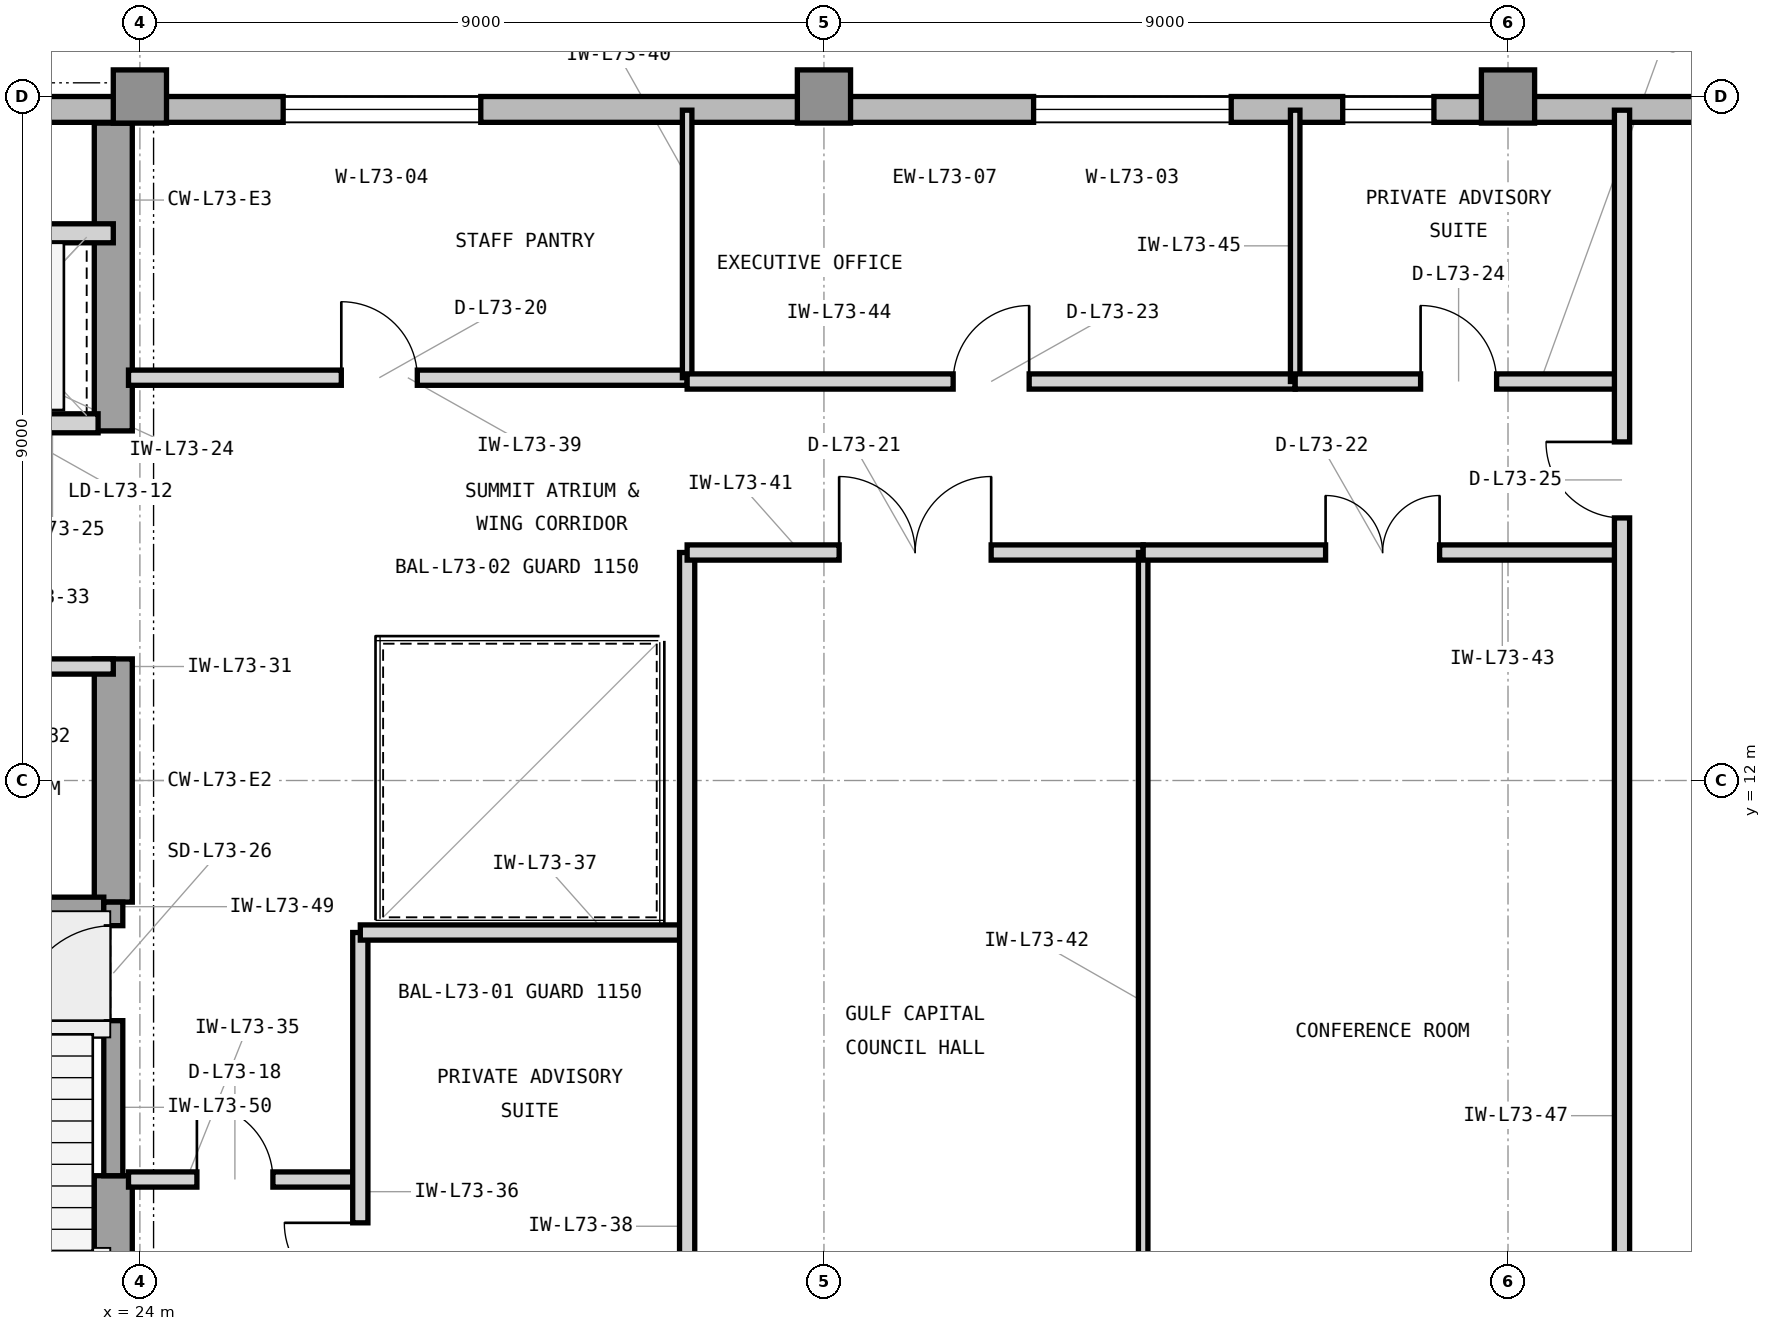
"""IFC4 building model, lengths in metres.
Left out: names, types, materials, properties, quantities, classifications, styles, units other than length and angle.
Written with IfcOpenShell. Run it as: python <this file> out.ifc"""

import sys

from ifc_helpers import new_model, si_unit, direction, frame, frame_2d, origin, origin_2d, place, context, subcontext, project, spatial, rectangle, extrude, element, fill, save


model = new_model("IFC4")
c1 = context("Model", 3, precision=1e-05, world=origin(), true_north=direction((0.0, 1.0)))
c2 = subcontext(c1, "Body", "Model", "MODEL_VIEW")
j1 = project(units=[si_unit("LENGTHUNIT", "METRE"), si_unit("PLANEANGLEUNIT", "RADIAN")], contexts=[c1])
p1 = place(None, origin())
s1 = spatial("IfcSite", under=j1, at=p1, CompositionType="ELEMENT")
p2 = place(p1, origin())
s2 = spatial("IfcBuilding", under=s1, at=p2, CompositionType="ELEMENT")
p3 = place(p2, frame((0.0, 0.0, 297.6)))
s3 = spatial("IfcBuildingStorey", under=s2, at=p3, CompositionType="ELEMENT", Elevation=297.6)
p4 = place(p3, frame((23.65, 3.6, 0.0), z_axis=(0.0, 0.0, 1.0), x_axis=(0.0, 1.0, 0.0)))
e1 = element("IfcWall", 1, at=p4, inside=s3, PredefinedType="SHEAR", context=c2, shape_type="SweptSolid", body=[
    extrude(rectangle(XDim=3.2, YDim=0.5, at=frame_2d((1.6, 0.0))), origin(), (0.0, 0.0, 1.0), 3.9),
])
p5 = place(p3, frame((23.65, 10.4, 0.0), z_axis=(0.0, 0.0, 1.0), x_axis=(0.0, 1.0, 0.0)))
e2 = element("IfcWall", 2, at=p5, inside=s3, PredefinedType="SHEAR", context=c2, shape_type="SweptSolid", body=[
    extrude(rectangle(XDim=3.2, YDim=0.5, at=frame_2d((1.6, 0.0))), origin(), (0.0, 0.0, 1.0), 3.9),
])
p6 = place(p3, frame((23.65, 16.6, 0.0), z_axis=(0.0, 0.0, 1.0), x_axis=(0.0, 1.0, 0.0)))
e3 = element("IfcWall", 3, at=p6, inside=s3, PredefinedType="SHEAR", context=c2, shape_type="SweptSolid", body=[
    extrude(rectangle(XDim=4.05, YDim=0.5, at=frame_2d((2.025, 0.0))), origin(), (0.0, 0.0, 1.0), 3.9),
])
for number, where, z_axis, x_axis in (
    (4, (24.0, 21.0, 0.0), (0.0, 0.0, 1.0), (1.0, 0.0, 0.0)),
    (5, (33.0, 21.0, 0.0), (0.0, 0.0, 1.0), (1.0, 0.0, 0.0)),
    (6, (42.0, 21.0, 0.0), (0.0, 0.0, 1.0), (1.0, 0.0, 0.0)),
):
    element("IfcColumn", number, at=place(p3, frame(where, z_axis=z_axis, x_axis=x_axis)), inside=s3, PredefinedType="COLUMN", context=c2, shape_type="SweptSolid", body=[
        extrude(rectangle(XDim=0.7, YDim=0.7, at=origin_2d()), origin(), (0.0, 0.0, 1.0), 3.9),
    ])
p7 = place(p3, frame((49.4, 20.83, 0.0), z_axis=(0.0, 0.0, 1.0), x_axis=(-1.0, 0.0, 0.0)))
e7 = element("IfcWall", 7, at=p7, inside=s3, PredefinedType="STANDARD", context=c2, shape_type="SweptSolid", body=[
    extrude(rectangle(XDim=29.62, YDim=0.34, at=frame_2d((14.81, 0.0))), origin(), (0.0, 0.0, 1.0), 3.715),
])
p8 = place(p7, frame((11.042, 0.0, 0.8)))
e8 = element("IfcOpeningElement", 8, at=p8, cuts=e7, PredefinedType="OPENING", context=c2, shape_type="SweptSolid", body=[
    extrude(rectangle(XDim=2.6, YDim=2.35, at=frame_2d((1.3, 1.175))), frame((0.0, 0.18, 0.0), z_axis=(0.0, -1.0, 0.0), x_axis=(1.0, 0.0, 0.0)), (0.0, 0.0, 1.0), 0.36),
])
p9 = place(p7, frame((20.915, 0.0, 0.8)))
e9 = element("IfcOpeningElement", 9, at=p9, cuts=e7, PredefinedType="OPENING", context=c2, shape_type="SweptSolid", body=[
    extrude(rectangle(XDim=2.6, YDim=2.35, at=frame_2d((1.3, 1.175))), frame((0.0, 0.18, 0.0), z_axis=(0.0, -1.0, 0.0), x_axis=(1.0, 0.0, 0.0)), (0.0, 0.0, 1.0), 0.36),
])
p10 = place(p7, frame((8.375, 0.0, 0.8)))
e10 = element("IfcOpeningElement", 10, at=p10, cuts=e7, PredefinedType="OPENING", context=c2, shape_type="SweptSolid", body=[
    extrude(rectangle(XDim=1.2, YDim=2.35, at=frame_2d((0.6, 1.175))), frame((0.0, 0.18, 0.0), z_axis=(0.0, -1.0, 0.0), x_axis=(1.0, 0.0, 0.0)), (0.0, 0.0, 1.0), 0.36),
])
p11 = place(p3, frame((21.05, 16.7, 0.0), z_axis=(0.0, 0.0, 1.0), x_axis=(1.0, 0.0, 0.0)))
e11 = element("IfcWall", 11, at=p11, inside=s3, PredefinedType="PARTITIONING", context=c2, shape_type="SweptSolid", body=[
    extrude(rectangle(XDim=2.4, YDim=0.25, at=frame_2d((1.2, 0.0))), origin(), (0.0, 0.0, 1.0), 3.354),
])
p12 = place(p11, frame((0.52, 0.0, 0.0)))
e12 = element("IfcOpeningElement", 12, at=p12, cuts=e11, PredefinedType="OPENING", context=c2, shape_type="SweptSolid", body=[
    extrude(rectangle(XDim=1.15, YDim=2.25, at=frame_2d((0.575, 1.125))), frame((0.0, 0.135, 0.0), z_axis=(0.0, -1.0, 0.0), x_axis=(1.0, 0.0, 0.0)), (0.0, 0.0, 1.0), 0.27),
])
p13 = place(p3, frame((16.45, 19.2, 0.0), z_axis=(0.0, 0.0, 1.0), x_axis=(1.0, 0.0, 0.0)))
e13 = element("IfcWall", 13, at=p13, inside=s3, PredefinedType="PARTITIONING", context=c2, shape_type="SweptSolid", body=[
    extrude(rectangle(XDim=7.2, YDim=0.25, at=frame_2d((3.6, 0.0))), origin(), (0.0, 0.0, 1.0), 3.705),
])
p14 = place(p3, frame((18.45, 13.5, 0.0), z_axis=(0.0, 0.0, 1.0), x_axis=(1.0, 0.0, 0.0)))
e14 = element("IfcWall", 14, at=p14, inside=s3, PredefinedType="PARTITIONING", context=c2, shape_type="SweptSolid", body=[
    extrude(rectangle(XDim=5.2, YDim=0.2, at=frame_2d((2.6, 0.0))), origin(), (0.0, 0.0, 1.0), 3.354),
])
p15 = place(p14, frame((2.125, 0.0, 0.0)))
e15 = element("IfcOpeningElement", 15, at=p15, cuts=e14, PredefinedType="OPENING", context=c2, shape_type="SweptSolid", body=[
    extrude(rectangle(XDim=0.95, YDim=2.1, at=frame_2d((0.475, 1.05))), frame((0.0, 0.11, 0.0), z_axis=(0.0, -1.0, 0.0), x_axis=(1.0, 0.0, 0.0)), (0.0, 0.0, 1.0), 0.22),
])
p16 = place(p3, frame((23.85, 6.75, 0.0), z_axis=(0.0, 0.0, 1.0), x_axis=(1.0, 0.0, 0.0)))
e16 = element("IfcWall", 16, at=p16, inside=s3, PredefinedType="PARTITIONING", context=c2, shape_type="SweptSolid", body=[
    extrude(rectangle(XDim=3.05, YDim=0.2, at=frame_2d((1.525, 0.0))), origin(), (0.0, 0.0, 1.0), 3.705),
])
p17 = place(p16, frame((0.9, 0.0, 0.0)))
e17 = element("IfcOpeningElement", 17, at=p17, cuts=e16, PredefinedType="OPENING", context=c2, shape_type="SweptSolid", body=[
    extrude(rectangle(XDim=1.0, YDim=2.15, at=frame_2d((0.5, 1.075))), frame((0.0, 0.11, 0.0), z_axis=(0.0, -1.0, 0.0), x_axis=(1.0, 0.0, 0.0)), (0.0, 0.0, 1.0), 0.22),
])
p18 = place(p3, frame((26.9, 3.18, 0.0), z_axis=(0.0, 0.0, 1.0), x_axis=(0.0, 1.0, 0.0)))
e18 = element("IfcWall", 18, at=p18, inside=s3, PredefinedType="PARTITIONING", context=c2, shape_type="SweptSolid", body=[
    extrude(rectangle(XDim=6.82, YDim=0.2, at=frame_2d((3.41, 0.0))), origin(), (0.0, 0.0, 1.0), 3.705),
])
p19 = place(p18, frame((2.0, 0.0, 0.0)))
e19 = element("IfcOpeningElement", 19, at=p19, cuts=e18, PredefinedType="OPENING", context=c2, shape_type="SweptSolid", body=[
    extrude(rectangle(XDim=1.0, YDim=2.15, at=frame_2d((0.5, 1.075))), frame((0.0, 0.11, 0.0), z_axis=(0.0, -1.0, 0.0), x_axis=(1.0, 0.0, 0.0)), (0.0, 0.0, 1.0), 0.22),
])
p20 = place(p3, frame((26.9, 10.0, 0.0), z_axis=(0.0, 0.0, 1.0), x_axis=(1.0, 0.0, 0.0)))
e20 = element("IfcWall", 20, at=p20, inside=s3, PredefinedType="PARTITIONING", context=c2, shape_type="SweptSolid", body=[
    extrude(rectangle(XDim=4.3, YDim=0.2, at=frame_2d((2.15, 0.0))), origin(), (0.0, 0.0, 1.0), 3.705),
])
p21 = place(p3, frame((31.2, 3.18, 0.0), z_axis=(0.0, 0.0, 1.0), x_axis=(0.0, 1.0, 0.0)))
e21 = element("IfcWall", 21, at=p21, inside=s3, PredefinedType="PARTITIONING", context=c2, shape_type="SweptSolid", body=[
    extrude(rectangle(XDim=11.82, YDim=0.2, at=frame_2d((5.91, 0.0))), origin(), (0.0, 0.0, 1.0), 3.705),
])
p22 = place(p3, frame((23.85, 17.3, 0.0), z_axis=(0.0, 0.0, 1.0), x_axis=(1.0, 0.0, 0.0)))
e22 = element("IfcWall", 22, at=p22, inside=s3, PredefinedType="PARTITIONING", context=c2, shape_type="SweptSolid", body=[
    extrude(rectangle(XDim=7.35, YDim=0.2, at=frame_2d((3.675, 0.0))), origin(), (0.0, 0.0, 1.0), 3.705),
])
p23 = place(p22, frame((2.8, 0.0, 0.0)))
e23 = element("IfcOpeningElement", 23, at=p23, cuts=e22, PredefinedType="OPENING", context=c2, shape_type="SweptSolid", body=[
    extrude(rectangle(XDim=1.0, YDim=2.15, at=frame_2d((0.5, 1.075))), frame((0.0, 0.11, 0.0), z_axis=(0.0, -1.0, 0.0), x_axis=(1.0, 0.0, 0.0)), (0.0, 0.0, 1.0), 0.22),
])
p24 = place(p3, frame((31.2, 17.3, 0.0), z_axis=(0.0, 0.0, 1.0), x_axis=(0.0, 1.0, 0.0)))
e24 = element("IfcWall", 24, at=p24, inside=s3, PredefinedType="PARTITIONING", context=c2, shape_type="SweptSolid", body=[
    extrude(rectangle(XDim=3.52, YDim=0.125, at=frame_2d((1.76, 0.0))), origin(), (0.0, 0.0, 1.0), 3.705),
])
p25 = place(p3, frame((31.2, 15.0, 0.0), z_axis=(0.0, 0.0, 1.0), x_axis=(1.0, 0.0, 0.0)))
e25 = element("IfcWall", 25, at=p25, inside=s3, PredefinedType="PARTITIONING", context=c2, shape_type="SweptSolid", body=[
    extrude(rectangle(XDim=6.0, YDim=0.2, at=frame_2d((3.0, 0.0))), origin(), (0.0, 0.0, 1.0), 3.354),
])
p26 = place(p25, frame((2.0, 0.0, 0.0)))
e26 = element("IfcOpeningElement", 26, at=p26, cuts=e25, PredefinedType="OPENING", context=c2, shape_type="SweptSolid", body=[
    extrude(rectangle(XDim=2.0, YDim=2.5, at=frame_2d((1.0, 1.25))), frame((0.0, 0.11, 0.0), z_axis=(0.0, -1.0, 0.0), x_axis=(1.0, 0.0, 0.0)), (0.0, 0.0, 1.0), 0.22),
])
p27 = place(p3, frame((37.2, 3.18, 0.0), z_axis=(0.0, 0.0, 1.0), x_axis=(0.0, 1.0, 0.0)))
e27 = element("IfcWall", 27, at=p27, inside=s3, PredefinedType="PARTITIONING", context=c2, shape_type="SweptSolid", body=[
    extrude(rectangle(XDim=11.82, YDim=0.125, at=frame_2d((5.91, 0.0))), origin(), (0.0, 0.0, 1.0), 3.705),
])
p28 = place(p3, frame((37.2, 15.0, 0.0), z_axis=(0.0, 0.0, 1.0), x_axis=(1.0, 0.0, 0.0)))
e28 = element("IfcWall", 28, at=p28, inside=s3, PredefinedType="PARTITIONING", context=c2, shape_type="SweptSolid", body=[
    extrude(rectangle(XDim=6.3, YDim=0.2, at=frame_2d((3.15, 0.0))), origin(), (0.0, 0.0, 1.0), 3.354),
])
p29 = place(p28, frame((2.4, 0.0, 0.0)))
e29 = element("IfcOpeningElement", 29, at=p29, cuts=e28, PredefinedType="OPENING", context=c2, shape_type="SweptSolid", body=[
    extrude(rectangle(XDim=1.5, YDim=2.3, at=frame_2d((0.75, 1.15))), frame((0.0, 0.11, 0.0), z_axis=(0.0, -1.0, 0.0), x_axis=(1.0, 0.0, 0.0)), (0.0, 0.0, 1.0), 0.22),
])
p30 = place(p3, frame((31.2, 17.25, 0.0), z_axis=(0.0, 0.0, 1.0), x_axis=(1.0, 0.0, 0.0)))
e30 = element("IfcWall", 30, at=p30, inside=s3, PredefinedType="PARTITIONING", context=c2, shape_type="SweptSolid", body=[
    extrude(rectangle(XDim=8.0, YDim=0.2, at=frame_2d((4.0, 0.0))), origin(), (0.0, 0.0, 1.0), 3.705),
])
p31 = place(p30, frame((3.5, 0.0, 0.0)))
e31 = element("IfcOpeningElement", 31, at=p31, cuts=e30, PredefinedType="OPENING", context=c2, shape_type="SweptSolid", body=[
    extrude(rectangle(XDim=1.0, YDim=2.15, at=frame_2d((0.5, 1.075))), frame((0.0, 0.11, 0.0), z_axis=(0.0, -1.0, 0.0), x_axis=(1.0, 0.0, 0.0)), (0.0, 0.0, 1.0), 0.22),
])
p32 = place(p3, frame((39.2, 17.25, 0.0), z_axis=(0.0, 0.0, 1.0), x_axis=(0.0, 1.0, 0.0)))
e32 = element("IfcWall", 32, at=p32, inside=s3, PredefinedType="PARTITIONING", context=c2, shape_type="SweptSolid", body=[
    extrude(rectangle(XDim=3.57, YDim=0.125, at=frame_2d((1.785, 0.0))), origin(), (0.0, 0.0, 1.0), 3.705),
])
p33 = place(p3, frame((39.2, 17.25, 0.0), z_axis=(0.0, 0.0, 1.0), x_axis=(1.0, 0.0, 0.0)))
e33 = element("IfcWall", 33, at=p33, inside=s3, PredefinedType="PARTITIONING", context=c2, shape_type="SweptSolid", body=[
    extrude(rectangle(XDim=4.3, YDim=0.2, at=frame_2d((2.15, 0.0))), origin(), (0.0, 0.0, 1.0), 3.705),
])
p34 = place(p33, frame((1.65, 0.0, 0.0)))
e34 = element("IfcOpeningElement", 34, at=p34, cuts=e33, PredefinedType="OPENING", context=c2, shape_type="SweptSolid", body=[
    extrude(rectangle(XDim=1.0, YDim=2.15, at=frame_2d((0.5, 1.075))), frame((0.0, 0.11, 0.0), z_axis=(0.0, -1.0, 0.0), x_axis=(1.0, 0.0, 0.0)), (0.0, 0.0, 1.0), 0.22),
])
p35 = place(p3, frame((43.5, 3.18, 0.0), z_axis=(0.0, 0.0, 1.0), x_axis=(0.0, 1.0, 0.0)))
e35 = element("IfcWall", 35, at=p35, inside=s3, PredefinedType="PARTITIONING", context=c2, shape_type="SweptSolid", body=[
    extrude(rectangle(XDim=17.64, YDim=0.2, at=frame_2d((8.82, 0.0))), origin(), (0.0, 0.0, 1.0), 3.705),
])
p36 = place(p35, frame((12.275, 0.0, 0.0)))
e36 = element("IfcOpeningElement", 36, at=p36, cuts=e35, PredefinedType="OPENING", context=c2, shape_type="SweptSolid", body=[
    extrude(rectangle(XDim=1.0, YDim=2.15, at=frame_2d((0.5, 1.075))), frame((0.0, 0.11, 0.0), z_axis=(0.0, -1.0, 0.0), x_axis=(1.0, 0.0, 0.0)), (0.0, 0.0, 1.0), 0.22),
])
p37 = place(p3, frame((19.705, 10.34, 0.0), z_axis=(0.0, 0.0, 1.0), x_axis=(1.0, 0.0, 0.0)))
e37 = element("IfcWall", 37, at=p37, inside=s3, PredefinedType="SHEAR", context=c2, shape_type="SweptSolid", body=[
    extrude(rectangle(XDim=3.82, YDim=0.25, at=frame_2d((1.91, 0.0))), origin(), (0.0, 0.0, 1.0), 3.9),
])
p38 = place(p3, frame((23.65, 6.8, 0.0), z_axis=(0.0, 0.0, 1.0), x_axis=(0.0, 1.0, 0.0)))
e38 = element("IfcWall", 38, at=p38, inside=s3, PredefinedType="SHEAR", context=c2, shape_type="SweptSolid", body=[
    extrude(rectangle(XDim=3.6, YDim=0.25, at=frame_2d((1.8, 0.0))), origin(), (0.0, 0.0, 1.0), 3.9),
])
p39 = place(p38, frame((2.04, 0.0, 0.0)))
e39 = element("IfcOpeningElement", 39, at=p39, cuts=e38, PredefinedType="OPENING", context=c2, shape_type="SweptSolid", body=[
    extrude(rectangle(XDim=1.25, YDim=2.2, at=frame_2d((0.625, 1.1))), frame((0.0, 0.135, 0.0), z_axis=(0.0, -1.0, 0.0), x_axis=(1.0, 0.0, 0.0)), (0.0, 0.0, 1.0), 0.27),
])
p40 = place(p8, origin())
e40 = element("IfcWindow", 40, at=p40, inside=s3, PartitioningType="SINGLE_PANEL", PredefinedType="WINDOW", context=c2, shape_type="SweptSolid", body=[
    extrude(rectangle(XDim=2.6, YDim=2.35, at=frame_2d((1.3, 1.175))), frame((0.0, 0.11, 0.0), z_axis=(0.0, -1.0, 0.0), x_axis=(1.0, 0.0, 0.0)), (0.0, 0.0, 1.0), 0.06),
])
fill(e8, e40)
p41 = place(p9, origin())
e41 = element("IfcWindow", 41, at=p41, inside=s3, PartitioningType="SINGLE_PANEL", PredefinedType="WINDOW", context=c2, shape_type="SweptSolid", body=[
    extrude(rectangle(XDim=2.6, YDim=2.35, at=frame_2d((1.3, 1.175))), frame((0.0, 0.11, 0.0), z_axis=(0.0, -1.0, 0.0), x_axis=(1.0, 0.0, 0.0)), (0.0, 0.0, 1.0), 0.06),
])
fill(e9, e41)
p42 = place(p17, origin())
e42 = element("IfcDoor", 42, at=p42, inside=s3, OperationType="SINGLE_SWING_LEFT", PredefinedType="DOOR", context=c2, shape_type="SweptSolid", body=[
    extrude(rectangle(XDim=1.0, YDim=2.15, at=frame_2d((0.5, 1.075))), frame((0.0, 0.025, 0.0), z_axis=(0.0, -1.0, 0.0), x_axis=(1.0, 0.0, 0.0)), (0.0, 0.0, 1.0), 0.05),
])
fill(e17, e42)
p43 = place(p19, origin())
e43 = element("IfcDoor", 43, at=p43, inside=s3, OperationType="SINGLE_SWING_RIGHT", PredefinedType="DOOR", context=c2, shape_type="SweptSolid", body=[
    extrude(rectangle(XDim=1.0, YDim=2.15, at=frame_2d((0.5, 1.075))), frame((0.0, 0.025, 0.0), z_axis=(0.0, -1.0, 0.0), x_axis=(1.0, 0.0, 0.0)), (0.0, 0.0, 1.0), 0.05),
])
fill(e19, e43)
p44 = place(p23, origin())
e44 = element("IfcDoor", 44, at=p44, inside=s3, OperationType="SINGLE_SWING_LEFT", PredefinedType="DOOR", context=c2, shape_type="SweptSolid", body=[
    extrude(rectangle(XDim=1.0, YDim=2.15, at=frame_2d((0.5, 1.075))), frame((0.0, 0.025, 0.0), z_axis=(0.0, -1.0, 0.0), x_axis=(1.0, 0.0, 0.0)), (0.0, 0.0, 1.0), 0.05),
])
fill(e23, e44)
p45 = place(p26, origin())
e45 = element("IfcDoor", 45, at=p45, inside=s3, OperationType="DOUBLE_DOOR_SINGLE_SWING", PredefinedType="DOOR", context=c2, shape_type="SweptSolid", body=[
    extrude(rectangle(XDim=2.0, YDim=2.5, at=frame_2d((1.0, 1.25))), frame((0.0, 0.025, 0.0), z_axis=(0.0, -1.0, 0.0), x_axis=(1.0, 0.0, 0.0)), (0.0, 0.0, 1.0), 0.05),
])
fill(e26, e45)
p46 = place(p29, origin())
e46 = element("IfcDoor", 46, at=p46, inside=s3, OperationType="DOUBLE_DOOR_SINGLE_SWING", PredefinedType="DOOR", context=c2, shape_type="SweptSolid", body=[
    extrude(rectangle(XDim=1.5, YDim=2.3, at=frame_2d((0.75, 1.15))), frame((0.0, 0.025, 0.0), z_axis=(0.0, -1.0, 0.0), x_axis=(1.0, 0.0, 0.0)), (0.0, 0.0, 1.0), 0.05),
])
fill(e29, e46)
p47 = place(p31, origin())
e47 = element("IfcDoor", 47, at=p47, inside=s3, OperationType="SINGLE_SWING_RIGHT", PredefinedType="DOOR", context=c2, shape_type="SweptSolid", body=[
    extrude(rectangle(XDim=1.0, YDim=2.15, at=frame_2d((0.5, 1.075))), frame((0.0, 0.025, 0.0), z_axis=(0.0, -1.0, 0.0), x_axis=(1.0, 0.0, 0.0)), (0.0, 0.0, 1.0), 0.05),
])
fill(e31, e47)
p48 = place(p34, origin())
e48 = element("IfcDoor", 48, at=p48, inside=s3, OperationType="SINGLE_SWING_LEFT", PredefinedType="DOOR", context=c2, shape_type="SweptSolid", body=[
    extrude(rectangle(XDim=1.0, YDim=2.15, at=frame_2d((0.5, 1.075))), frame((0.0, 0.025, 0.0), z_axis=(0.0, -1.0, 0.0), x_axis=(1.0, 0.0, 0.0)), (0.0, 0.0, 1.0), 0.05),
])
fill(e34, e48)
p49 = place(p36, origin())
e49 = element("IfcDoor", 49, at=p49, inside=s3, OperationType="SINGLE_SWING_RIGHT", PredefinedType="DOOR", context=c2, shape_type="SweptSolid", body=[
    extrude(rectangle(XDim=1.0, YDim=2.15, at=frame_2d((0.5, 1.075))), frame((0.0, 0.025, 0.0), z_axis=(0.0, -1.0, 0.0), x_axis=(1.0, 0.0, 0.0)), (0.0, 0.0, 1.0), 0.05),
])
fill(e36, e49)
p50 = place(p39, origin())
e50 = element("IfcDoor", 50, at=p50, inside=s3, OperationType="SINGLE_SWING_LEFT", PredefinedType="DOOR", context=c2, shape_type="SweptSolid", body=[
    extrude(rectangle(XDim=1.25, YDim=2.2, at=frame_2d((0.625, 1.1))), frame((0.0, 0.025, 0.0), z_axis=(0.0, -1.0, 0.0), x_axis=(1.0, 0.0, 0.0)), (0.0, 0.0, 1.0), 0.05),
])
fill(e39, e50)
p51 = place(p10, origin())
e51 = element("IfcWindow", 51, at=p51, inside=s3, PartitioningType="SINGLE_PANEL", PredefinedType="WINDOW", context=c2, shape_type="SweptSolid", body=[
    extrude(rectangle(XDim=1.2, YDim=2.35, at=frame_2d((0.6, 1.175))), frame((0.0, 0.11, 0.0), z_axis=(0.0, -1.0, 0.0), x_axis=(1.0, 0.0, 0.0)), (0.0, 0.0, 1.0), 0.06),
])
fill(e10, e51)
save(model, sys.argv[1])
